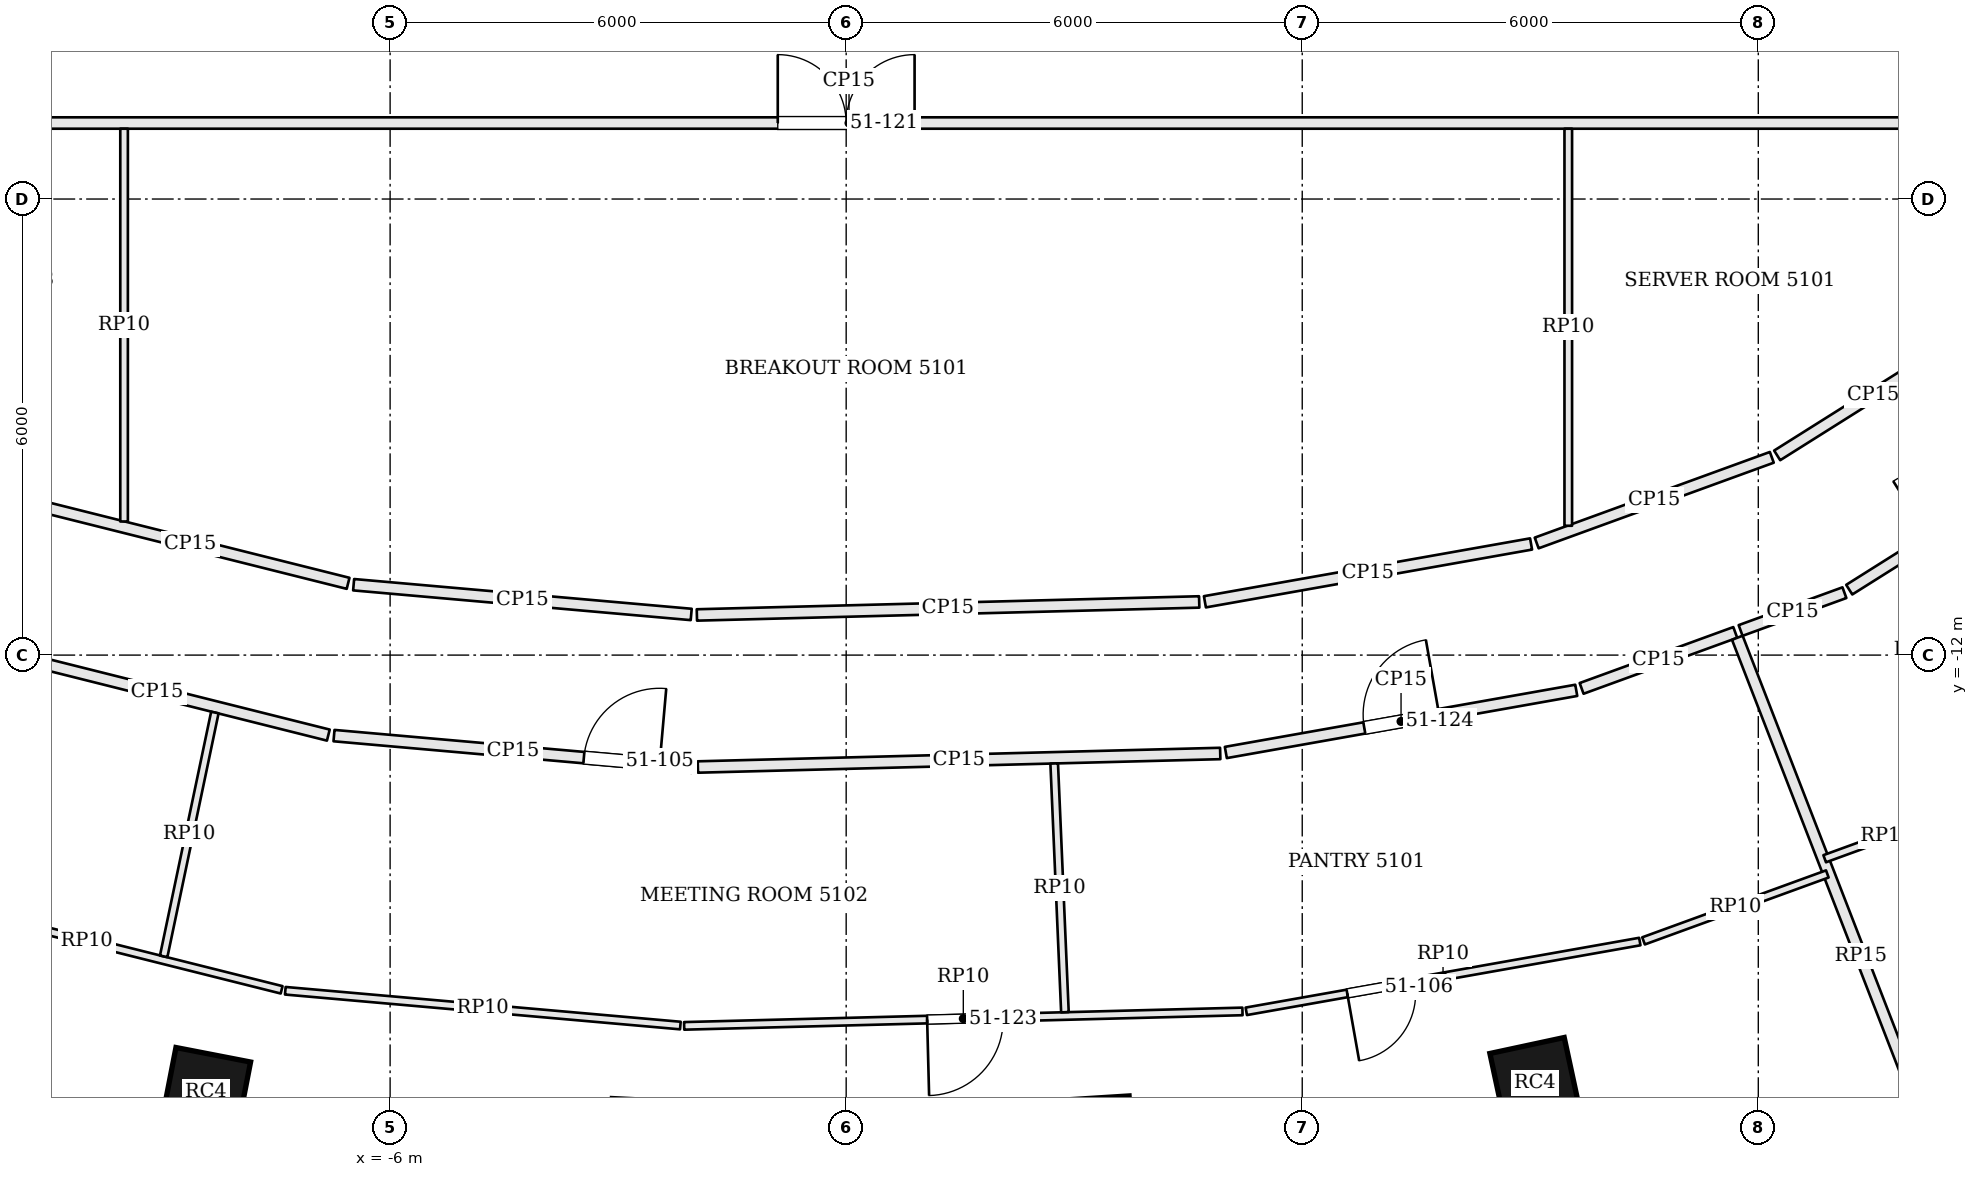
"""IFC4 building model, lengths in metres.
Left out: names, types, materials, properties, quantities, classifications, styles, units other than length and angle.
Written with IfcOpenShell. Run it as: python <this file> out.ifc"""

import sys

from ifc_helpers import new_model, si_unit, direction, frame, frame_2d, origin, origin_2d, place, context, subcontext, project, spatial, rectangle, extrude, element, fill, save


model = new_model("IFC4")
c1 = context("Model", 3, precision=1e-05, world=origin(), true_north=direction((0.0, 1.0)))
c2 = subcontext(c1, "Body", "Model", "MODEL_VIEW")
j1 = project(units=[si_unit("LENGTHUNIT", "METRE"), si_unit("PLANEANGLEUNIT", "RADIAN")], contexts=[c1])
p1 = place(None, origin())
s1 = spatial("IfcSite", under=j1, at=p1, CompositionType="ELEMENT")
p2 = place(p1, origin())
s2 = spatial("IfcBuilding", under=s1, at=p2, CompositionType="ELEMENT")
p3 = place(p2, frame((0.0, 0.0, 209.1)))
s3 = spatial("IfcBuildingStorey", under=s2, at=p3, CompositionType="ELEMENT", Elevation=209.1)
for number, where, z_axis, x_axis in (
    (1, (-8.422, -17.749, 0.0), (0.0, 0.0, 1.0), (0.982, -0.191, 0.0)),
    (2, (3.254, -18.33, 0.0), (0.0, 0.0, 1.0), (0.998, 0.063, 0.0)),
    (3, (9.063, -17.625, 0.0), (0.0, 0.0, 1.0), (0.978, 0.21, 0.0)),
):
    element("IfcColumn", number, at=place(p3, frame(where, z_axis=z_axis, x_axis=x_axis)), inside=s3, PredefinedType="COLUMN", context=c2, shape_type="SweptSolid", body=[
        extrude(rectangle(XDim=1.0, YDim=1.0, at=origin_2d()), origin(), (0.0, 0.0, 1.0), 3.9),
    ])
p4 = place(p3, frame((-12.719, -17.526, 0.0), z_axis=(0.0, 0.0, 1.0), x_axis=(0.898643806462, -0.438679050226, 0.0)))
e4 = element("IfcWall", 4, at=p4, inside=s3, PredefinedType="SOLIDWALL", context=c2, shape_type="SweptSolid", body=[
    extrude(rectangle(XDim=2.523, YDim=0.45, at=frame_2d((1.262, 0.0))), origin(), (0.0, 0.0, 1.0), 3.7),
])
p5 = place(p4, frame((0.212, 0.0, 0.9)))
e5 = element("IfcOpeningElement", 5, at=p5, cuts=e4, PredefinedType="OPENING", context=c2, shape_type="SweptSolid", body=[
    extrude(rectangle(XDim=2.1, YDim=2.3, at=frame_2d((1.05, 1.15))), frame((0.0, 0.235, 0.0), z_axis=(0.0, -1.0, 0.0), x_axis=(1.0, 0.0, 0.0)), (0.0, 0.0, 1.0), 0.47),
])
p6 = place(p3, frame((-11.319, -11.923, 0.0), z_axis=(0.0, 0.0, 1.0), x_axis=(0.969990815038, -0.243141561114, 0.0)))
e6 = element("IfcWall", 6, at=p6, inside=s3, PredefinedType="PARTITIONING", context=c2, shape_type="SweptSolid", body=[
    extrude(rectangle(XDim=4.645, YDim=0.15, at=frame_2d((2.323, 0.0))), origin(), (0.0, 0.0, 1.0), 3.084),
])
p7 = place(p3, frame((-6.738, -13.059, 0.0), z_axis=(0.0, 0.0, 1.0), x_axis=(0.996143527037, -0.087738666181, 0.0)))
e7 = element("IfcWall", 7, at=p7, inside=s3, PredefinedType="PARTITIONING", context=c2, shape_type="SweptSolid", body=[
    extrude(rectangle(XDim=4.73, YDim=0.15, at=frame_2d((2.365, 0.0))), origin(), (0.0, 0.0, 1.0), 3.084),
])
p8 = place(p7, frame((3.3, 0.0, 0.0)))
e8 = element("IfcOpeningElement", 8, at=p8, cuts=e7, PredefinedType="OPENING", context=c2, shape_type="SweptSolid", body=[
    extrude(rectangle(XDim=1.0, YDim=2.4, at=frame_2d((0.5, 1.2))), frame((0.0, 0.085, 0.0), z_axis=(0.0, -1.0, 0.0), x_axis=(1.0, 0.0, 0.0)), (0.0, 0.0, 1.0), 0.17),
])
p9 = place(p3, frame((-1.951, -13.472, 0.0), z_axis=(0.0, 0.0, 1.0), x_axis=(0.999663898238, 0.025924709429, 0.0)))
e9 = element("IfcWall", 9, at=p9, inside=s3, PredefinedType="PARTITIONING", context=c2, shape_type="SweptSolid", body=[
    extrude(rectangle(XDim=6.875, YDim=0.15, at=frame_2d((3.437, 0.0))), origin(), (0.0, 0.0, 1.0), 3.084),
])
p10 = place(p3, frame((4.995, -13.281, 0.0), z_axis=(0.0, 0.0, 1.0), x_axis=(0.98463411377, 0.174630071865, 0.0)))
e10 = element("IfcWall", 10, at=p10, inside=s3, PredefinedType="PARTITIONING", context=c2, shape_type="SweptSolid", body=[
    extrude(rectangle(XDim=4.682, YDim=0.15, at=frame_2d((2.341, 0.0))), origin(), (0.0, 0.0, 1.0), 3.084),
])
p11 = place(p10, frame((1.85, 0.0, 0.0)))
e11 = element("IfcOpeningElement", 11, at=p11, cuts=e10, PredefinedType="OPENING", context=c2, shape_type="SweptSolid", body=[
    extrude(rectangle(XDim=1.0, YDim=2.1, at=frame_2d((0.5, 1.05))), frame((0.0, 0.085, 0.0), z_axis=(0.0, -1.0, 0.0), x_axis=(1.0, 0.0, 0.0)), (0.0, 0.0, 1.0), 0.17),
])
p12 = place(p3, frame((9.676, -12.438, 0.0), z_axis=(0.0, 0.0, 1.0), x_axis=(0.939644231496, 0.342153062556, 0.0)))
e12 = element("IfcWall", 12, at=p12, inside=s3, PredefinedType="PARTITIONING", context=c2, shape_type="SweptSolid", body=[
    extrude(rectangle(XDim=2.151, YDim=0.15, at=frame_2d((1.076, 0.0))), origin(), (0.0, 0.0, 1.0), 3.084),
])
p13 = place(p3, frame((14.976, -20.153, 0.0), z_axis=(0.0, 0.0, 1.0), x_axis=(-0.361710929676, 0.932290299935, 0.0)))
e13 = element("IfcWall", 13, at=p13, inside=s3, PredefinedType="PARTITIONING", context=c2, shape_type="SweptSolid", body=[
    extrude(rectangle(XDim=8.99, YDim=0.15, at=frame_2d((4.495, 0.0))), origin(), (0.0, 0.0, 1.0), 3.084),
])
p14 = place(p3, frame((11.767, -11.676, 0.0), z_axis=(0.0, 0.0, 1.0), x_axis=(0.939641296478, 0.342161122797, 0.0)))
e14 = element("IfcWall", 14, at=p14, inside=s3, PredefinedType="PARTITIONING", context=c2, shape_type="SweptSolid", body=[
    extrude(rectangle(XDim=1.453, YDim=0.15, at=frame_2d((0.727, 0.0))), origin(), (0.0, 0.0, 1.0), 3.084),
])
p15 = place(p3, frame((13.197, -11.139, 0.0), z_axis=(0.0, 0.0, 1.0), x_axis=(0.846390903833, 0.532562144644, 0.0)))
e15 = element("IfcWall", 15, at=p15, inside=s3, PredefinedType="PARTITIONING", context=c2, shape_type="SweptSolid", body=[
    extrude(rectangle(XDim=3.481, YDim=0.15, at=frame_2d((1.741, 0.0))), origin(), (0.0, 0.0, 1.0), 3.084),
])
p16 = place(p15, frame((1.25, 0.0, 0.0)))
e16 = element("IfcOpeningElement", 16, at=p16, cuts=e15, PredefinedType="OPENING", context=c2, shape_type="SweptSolid", body=[
    extrude(rectangle(XDim=1.8, YDim=2.1, at=frame_2d((0.9, 1.05))), frame((0.0, 0.085, 0.0), z_axis=(0.0, -1.0, 0.0), x_axis=(1.0, 0.0, 0.0)), (0.0, 0.0, 1.0), 0.17),
])
p17 = place(p3, frame((14.777, -7.781, 0.0), z_axis=(0.0, 0.0, 1.0), x_axis=(-0.846359741043, -0.532611667862, 0.0)))
e17 = element("IfcWall", 17, at=p17, inside=s3, PredefinedType="PARTITIONING", context=c2, shape_type="SweptSolid", body=[
    extrude(rectangle(XDim=2.987, YDim=0.15, at=frame_2d((1.494, 0.0))), origin(), (0.0, 0.0, 1.0), 3.084),
])
p18 = place(p3, frame((12.178, -9.398, 0.0), z_axis=(0.0, 0.0, 1.0), x_axis=(-0.939609240084, -0.342249143093, 0.0)))
e18 = element("IfcWall", 18, at=p18, inside=s3, PredefinedType="PARTITIONING", context=c2, shape_type="SweptSolid", body=[
    extrude(rectangle(XDim=3.292, YDim=0.15, at=frame_2d((1.646, 0.0))), origin(), (0.0, 0.0, 1.0), 3.084),
])
p19 = place(p3, frame((9.01, -10.538, 0.0), z_axis=(0.0, 0.0, 1.0), x_axis=(-0.984645638575, -0.174565077936, 0.0)))
e19 = element("IfcWall", 19, at=p19, inside=s3, PredefinedType="PARTITIONING", context=c2, shape_type="SweptSolid", body=[
    extrude(rectangle(XDim=4.358, YDim=0.15, at=frame_2d((2.179, 0.0))), origin(), (0.0, 0.0, 1.0), 3.084),
])
p20 = place(p3, frame((4.645, -11.301, 0.0), z_axis=(0.0, 0.0, 1.0), x_axis=(-0.9996648469, -0.02588810291, 0.0)))
e20 = element("IfcWall", 20, at=p20, inside=s3, PredefinedType="PARTITIONING", context=c2, shape_type="SweptSolid", body=[
    extrude(rectangle(XDim=6.611, YDim=0.15, at=frame_2d((3.305, 0.0))), origin(), (0.0, 0.0, 1.0), 3.084),
])
p21 = place(p3, frame((-2.039, -11.465, 0.0), z_axis=(0.0, 0.0, 1.0), x_axis=(-0.996139855484, 0.087780341286, 0.0)))
e21 = element("IfcWall", 21, at=p21, inside=s3, PredefinedType="PARTITIONING", context=c2, shape_type="SweptSolid", body=[
    extrude(rectangle(XDim=4.458, YDim=0.15, at=frame_2d((2.229, 0.0))), origin(), (0.0, 0.0, 1.0), 3.084),
])
p22 = place(p3, frame((-6.553, -11.056, 0.0), z_axis=(0.0, 0.0, 1.0), x_axis=(-0.970004917182, 0.243085294995, 0.0)))
e22 = element("IfcWall", 22, at=p22, inside=s3, PredefinedType="PARTITIONING", context=c2, shape_type="SweptSolid", body=[
    extrude(rectangle(XDim=4.284, YDim=0.15, at=frame_2d((2.142, 0.0))), origin(), (0.0, 0.0, 1.0), 3.084),
])
p23 = place(p3, frame((-14.925, -5.0, 0.0), z_axis=(0.0, 0.0, 1.0), x_axis=(1.0, 0.0, 0.0)))
e23 = element("IfcWall", 23, at=p23, inside=s3, PredefinedType="PARTITIONING", context=c2, shape_type="SweptSolid", body=[
    extrude(rectangle(XDim=29.925, YDim=0.15, at=frame_2d((14.962, 0.0))), origin(), (0.0, 0.0, 1.0), 3.084),
])
p24 = place(p23, frame((14.025, 0.0, 0.0)))
e24 = element("IfcOpeningElement", 24, at=p24, cuts=e23, PredefinedType="OPENING", context=c2, shape_type="SweptSolid", body=[
    extrude(rectangle(XDim=1.8, YDim=2.1, at=frame_2d((0.9, 1.05))), frame((0.0, 0.085, 0.0), z_axis=(0.0, -1.0, 0.0), x_axis=(1.0, 0.0, 0.0)), (0.0, 0.0, 1.0), 0.17),
])
p25 = place(p3, frame((12.908, -14.879, 0.0), z_axis=(0.0, 0.0, 1.0), x_axis=(-0.939624337336, -0.342207692323, 0.0)))
e25 = element("IfcWall", 25, at=p25, inside=s3, PredefinedType="PARTITIONING", context=c2, shape_type="SweptSolid", body=[
    extrude(rectangle(XDim=2.573, YDim=0.1, at=frame_2d((1.287, 0.0))), origin(), (0.0, 0.0, 1.0), 3.084),
])
p26 = place(p3, frame((10.441, -15.769, 0.0), z_axis=(0.0, 0.0, 1.0), x_axis=(-0.984642067447, -0.174585219919, 0.0)))
e26 = element("IfcWall", 26, at=p26, inside=s3, PredefinedType="PARTITIONING", context=c2, shape_type="SweptSolid", body=[
    extrude(rectangle(XDim=5.258, YDim=0.1, at=frame_2d((2.629, 0.0))), origin(), (0.0, 0.0, 1.0), 3.084),
])
p27 = place(p26, frame((3.009, 0.0, 0.0)))
e27 = element("IfcOpeningElement", 27, at=p27, cuts=e26, PredefinedType="OPENING", context=c2, shape_type="SweptSolid", body=[
    extrude(rectangle(XDim=0.9, YDim=2.1, at=frame_2d((0.45, 1.05))), frame((0.0, 0.06, 0.0), z_axis=(0.0, -1.0, 0.0), x_axis=(1.0, 0.0, 0.0)), (0.0, 0.0, 1.0), 0.12),
])
p28 = place(p3, frame((5.214, -16.688, 0.0), z_axis=(0.0, 0.0, 1.0), x_axis=(-0.999664981446, -0.025882906921, 0.0)))
e28 = element("IfcWall", 28, at=p28, inside=s3, PredefinedType="PARTITIONING", context=c2, shape_type="SweptSolid", body=[
    extrude(rectangle(XDim=7.348, YDim=0.1, at=frame_2d((3.674, 0.0))), origin(), (0.0, 0.0, 1.0), 3.084),
])
p29 = place(p28, frame((3.15, 0.0, 0.0)))
e29 = element("IfcOpeningElement", 29, at=p29, cuts=e28, PredefinedType="OPENING", context=c2, shape_type="SweptSolid", body=[
    extrude(rectangle(XDim=1.0, YDim=2.4, at=frame_2d((0.5, 1.2))), frame((0.0, 0.06, 0.0), z_axis=(0.0, -1.0, 0.0), x_axis=(1.0, 0.0, 0.0)), (0.0, 0.0, 1.0), 0.12),
])
p30 = place(p3, frame((-2.181, -16.874, 0.0), z_axis=(0.0, 0.0, 1.0), x_axis=(-0.996143934904, 0.087734035321, 0.0)))
e30 = element("IfcWall", 30, at=p30, inside=s3, PredefinedType="PARTITIONING", context=c2, shape_type="SweptSolid", body=[
    extrude(rectangle(XDim=5.218, YDim=0.1, at=frame_2d((2.609, 0.0))), origin(), (0.0, 0.0, 1.0), 3.084),
])
p31 = place(p3, frame((-7.427, -16.404, 0.0), z_axis=(0.0, 0.0, 1.0), x_axis=(-0.970009158253, 0.243068370845, 0.0)))
e31 = element("IfcWall", 31, at=p31, inside=s3, PredefinedType="PARTITIONING", context=c2, shape_type="SweptSolid", body=[
    extrude(rectangle(XDim=5.283, YDim=0.1, at=frame_2d((2.642, 0.0))), origin(), (0.0, 0.0, 1.0), 3.084),
])
p32 = place(p3, frame((-8.306, -12.756, 0.0), z_axis=(0.0, 0.0, 1.0), x_axis=(-0.205432339041, -0.978671320759, 0.0)))
e32 = element("IfcWall", 32, at=p32, inside=s3, PredefinedType="PARTITIONING", context=c2, shape_type="SweptSolid", body=[
    extrude(rectangle(XDim=3.278, YDim=0.1, at=frame_2d((1.639, 0.0))), origin(), (0.0, 0.0, 1.0), 3.084),
])
p33 = place(p3, frame((2.737, -13.426, 0.0), z_axis=(0.0, 0.0, 1.0), x_axis=(0.043081420795, -0.999071564595, 0.0)))
e33 = element("IfcWall", 33, at=p33, inside=s3, PredefinedType="PARTITIONING", context=c2, shape_type="SweptSolid", body=[
    extrude(rectangle(XDim=3.275, YDim=0.1, at=frame_2d((1.638, 0.0))), origin(), (0.0, 0.0, 1.0), 3.084),
])
p34 = place(p3, frame((14.502, -14.086, 0.0), z_axis=(0.0, 0.0, 1.0), x_axis=(-0.93966171002, -0.342105058019, 0.0)))
e34 = element("IfcWall", 34, at=p34, inside=s3, PredefinedType="PARTITIONING", context=c2, shape_type="SweptSolid", body=[
    extrude(rectangle(XDim=1.733, YDim=0.1, at=frame_2d((0.866, 0.0))), origin(), (0.0, 0.0, 1.0), 3.084),
])
p35 = place(p3, frame((-9.5, -10.242, 0.0), z_axis=(0.0, 0.0, 1.0), x_axis=(0.0, 1.0, 0.0)))
e35 = element("IfcWall", 35, at=p35, inside=s3, PredefinedType="PARTITIONING", context=c2, shape_type="SweptSolid", body=[
    extrude(rectangle(XDim=5.167, YDim=0.1, at=frame_2d((2.583, 0.0))), origin(), (0.0, 0.0, 1.0), 3.084),
])
p36 = place(p3, frame((9.5, -10.299, 0.0), z_axis=(0.0, 0.0, 1.0), x_axis=(0.0, 1.0, 0.0)))
e36 = element("IfcWall", 36, at=p36, inside=s3, PredefinedType="PARTITIONING", context=c2, shape_type="SweptSolid", body=[
    extrude(rectangle(XDim=5.224, YDim=0.1, at=frame_2d((2.612, 0.0))), origin(), (0.0, 0.0, 1.0), 3.084),
])
p37 = place(p8, origin())
e37 = element("IfcDoor", 37, at=p37, inside=s3, OperationType="SINGLE_SWING_RIGHT", PredefinedType="DOOR", context=c2, shape_type="SweptSolid", body=[
    extrude(rectangle(XDim=1.0, YDim=2.4, at=frame_2d((0.5, 1.2))), frame((0.0, 0.025, 0.0), z_axis=(0.0, -1.0, 0.0), x_axis=(1.0, 0.0, 0.0)), (0.0, 0.0, 1.0), 0.05),
])
fill(e8, e37)
p38 = place(p27, origin())
e38 = element("IfcDoor", 38, at=p38, inside=s3, OperationType="SINGLE_SWING_RIGHT", PredefinedType="DOOR", context=c2, shape_type="SweptSolid", body=[
    extrude(rectangle(XDim=0.9, YDim=2.1, at=frame_2d((0.45, 1.05))), frame((0.0, 0.025, 0.0), z_axis=(0.0, -1.0, 0.0), x_axis=(1.0, 0.0, 0.0)), (0.0, 0.0, 1.0), 0.05),
])
fill(e27, e38)
p39 = place(p24, origin())
e39 = element("IfcDoor", 39, at=p39, inside=s3, OperationType="DOUBLE_DOOR_SINGLE_SWING", PredefinedType="DOOR", context=c2, shape_type="SweptSolid", body=[
    extrude(rectangle(XDim=1.8, YDim=2.1, at=frame_2d((0.9, 1.05))), frame((0.0, 0.025, 0.0), z_axis=(0.0, -1.0, 0.0), x_axis=(1.0, 0.0, 0.0)), (0.0, 0.0, 1.0), 0.05),
])
fill(e24, e39)
p40 = place(p29, origin())
e40 = element("IfcDoor", 40, at=p40, inside=s3, OperationType="SINGLE_SWING_RIGHT", PredefinedType="DOOR", context=c2, shape_type="SweptSolid", body=[
    extrude(rectangle(XDim=1.0, YDim=2.4, at=frame_2d((0.5, 1.2))), frame((0.0, 0.025, 0.0), z_axis=(0.0, -1.0, 0.0), x_axis=(1.0, 0.0, 0.0)), (0.0, 0.0, 1.0), 0.05),
])
fill(e29, e40)
p41 = place(p11, origin())
e41 = element("IfcDoor", 41, at=p41, inside=s3, OperationType="SINGLE_SWING_RIGHT", PredefinedType="DOOR", context=c2, shape_type="SweptSolid", body=[
    extrude(rectangle(XDim=1.0, YDim=2.1, at=frame_2d((0.5, 1.05))), frame((0.0, 0.025, 0.0), z_axis=(0.0, -1.0, 0.0), x_axis=(1.0, 0.0, 0.0)), (0.0, 0.0, 1.0), 0.05),
])
fill(e11, e41)
save(model, sys.argv[1])
